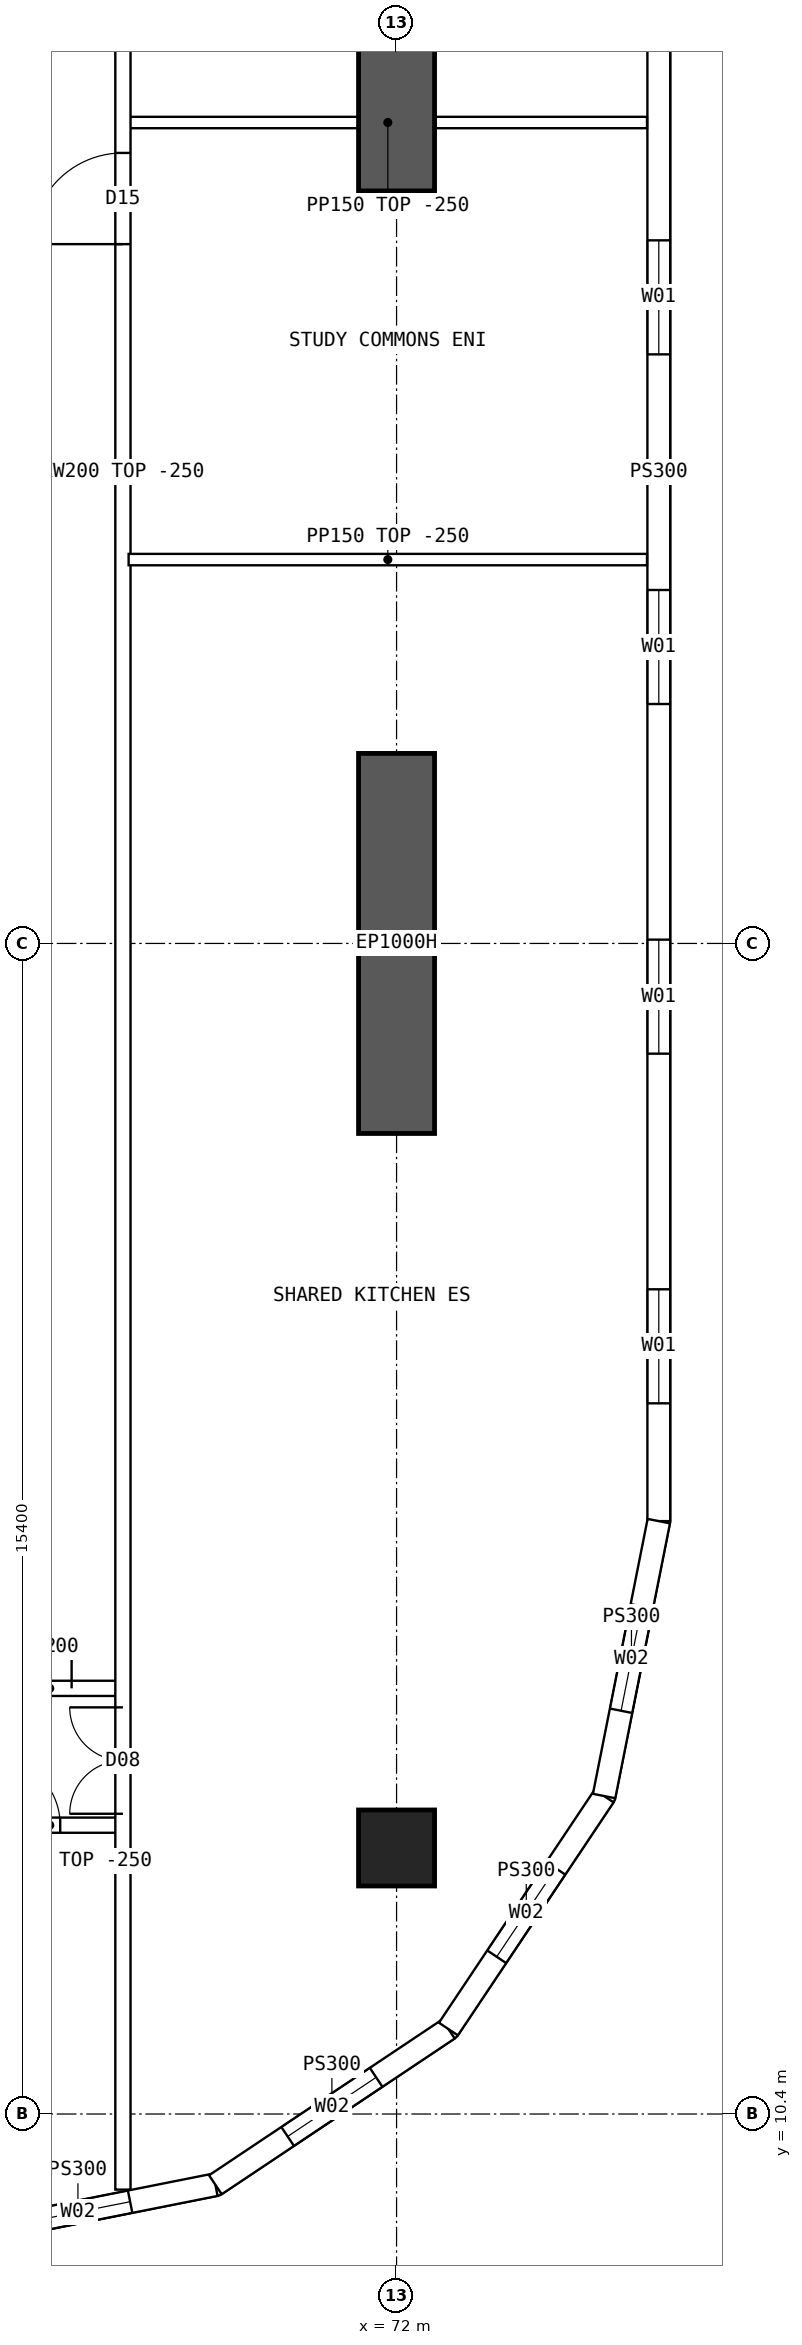
"""IFC4 building model, lengths in metres.
Left out: names, types, materials, properties, quantities, classifications, styles, units other than length and angle.
Written with IfcOpenShell. Run it as: python <this file> out.ifc"""

import sys

from ifc_helpers import new_model, si_unit, direction, frame, frame_2d, origin, origin_2d, place, context, subcontext, project, spatial, polyline, rectangle, hollow_rectangle, outline, extrude, element, fill, save


model = new_model("IFC4")
c1 = context("Model", 3, precision=1e-05, world=origin(), true_north=direction((0.0, 1.0)))
c2 = subcontext(c1, "Body", "Model", "MODEL_VIEW")
j1 = project(units=[si_unit("LENGTHUNIT", "METRE"), si_unit("PLANEANGLEUNIT", "RADIAN")], contexts=[c1])
p1 = place(None, origin())
s1 = spatial("IfcSite", under=j1, at=p1, CompositionType="ELEMENT")
p2 = place(p1, origin())
s2 = spatial("IfcBuilding", under=s1, at=p2, CompositionType="ELEMENT")
p3 = place(p2, frame((0.0, 0.0, 103.15)))
s3 = spatial("IfcBuildingStorey", under=s2, at=p3, CompositionType="ELEMENT", Elevation=103.15)
p4 = place(p3, frame((72.0, 13.9, 0.0), z_axis=(0.0, 0.0, 1.0), x_axis=(1.0, 0.0, 0.0)))
e1 = element("IfcColumn", 1, at=p4, inside=s3, PredefinedType="COLUMN", context=c2, shape_type="SweptSolid", body=[
    extrude(hollow_rectangle(XDim=1.0, YDim=1.0, WallThickness=0.1, at=origin_2d()), origin(), (0.0, 0.0, 1.0), 3.75),
])
for number, where, z_axis, x_axis in (
    (2, (72.0, 23.3, 0.0), (0.0, 0.0, 1.0), (0.0, 1.0, 0.0)),
    (3, (72.0, 35.7, 0.0), (0.0, 0.0, 1.0), (0.0, 1.0, 0.0)),
):
    element("IfcWall", number, at=place(p3, frame(where, z_axis=z_axis, x_axis=x_axis)), inside=s3, PredefinedType="SHEAR", context=c2, shape_type="SweptSolid", body=[
        extrude(rectangle(XDim=5.0, YDim=1.0, at=frame_2d((2.5, 0.0))), origin(), (0.0, 0.0, 1.0), 3.75),
    ])
p5 = place(p3, frame((75.45, 18.2, 0.0), z_axis=(0.0, 0.0, 1.0), x_axis=(0.0, 1.0, 0.0)))
e4 = element("IfcWall", 4, at=p5, inside=s3, PredefinedType="SOLIDWALL", context=c2, shape_type="SweptSolid", body=[
    extrude(outline(polyline([(-0.015, -0.15), (27.615, -0.15), (27.585, 0.15), (0.015, 0.15), (-0.015, -0.15)])), origin(), (0.0, 0.0, 1.0), 3.5),
])
p6 = place(p5, frame((1.55, 0.0, 0.9)))
e5 = element("IfcOpeningElement", 5, at=p6, cuts=e4, PredefinedType="OPENING", context=c2, shape_type="SweptSolid", body=[
    extrude(rectangle(XDim=1.5, YDim=2.0, at=frame_2d((0.75, 1.0))), frame((0.0, 0.16, 0.0), z_axis=(0.0, -1.0, 0.0), x_axis=(1.0, 0.0, 0.0)), (0.0, 0.0, 1.0), 0.32),
])
p7 = place(p5, frame((6.15, 0.0, 0.9)))
e6 = element("IfcOpeningElement", 6, at=p7, cuts=e4, PredefinedType="OPENING", context=c2, shape_type="SweptSolid", body=[
    extrude(rectangle(XDim=1.5, YDim=2.0, at=frame_2d((0.75, 1.0))), frame((0.0, 0.16, 0.0), z_axis=(0.0, -1.0, 0.0), x_axis=(1.0, 0.0, 0.0)), (0.0, 0.0, 1.0), 0.32),
])
p8 = place(p5, frame((10.75, 0.0, 0.9)))
e7 = element("IfcOpeningElement", 7, at=p8, cuts=e4, PredefinedType="OPENING", context=c2, shape_type="SweptSolid", body=[
    extrude(rectangle(XDim=1.5, YDim=2.0, at=frame_2d((0.75, 1.0))), frame((0.0, 0.16, 0.0), z_axis=(0.0, -1.0, 0.0), x_axis=(1.0, 0.0, 0.0)), (0.0, 0.0, 1.0), 0.32),
])
p9 = place(p5, frame((15.35, 0.0, 0.9)))
e8 = element("IfcOpeningElement", 8, at=p9, cuts=e4, PredefinedType="OPENING", context=c2, shape_type="SweptSolid", body=[
    extrude(rectangle(XDim=1.5, YDim=2.0, at=frame_2d((0.75, 1.0))), frame((0.0, 0.16, 0.0), z_axis=(0.0, -1.0, 0.0), x_axis=(1.0, 0.0, 0.0)), (0.0, 0.0, 1.0), 0.32),
])
p10 = place(p5, frame((19.95, 0.0, 0.9)))
e9 = element("IfcOpeningElement", 9, at=p10, cuts=e4, PredefinedType="OPENING", context=c2, shape_type="SweptSolid", body=[
    extrude(rectangle(XDim=1.5, YDim=2.0, at=frame_2d((0.75, 1.0))), frame((0.0, 0.16, 0.0), z_axis=(0.0, -1.0, 0.0), x_axis=(1.0, 0.0, 0.0)), (0.0, 0.0, 1.0), 0.32),
])
p11 = place(p5, frame((24.55, 0.0, 0.9)))
e10 = element("IfcOpeningElement", 10, at=p11, cuts=e4, PredefinedType="OPENING", context=c2, shape_type="SweptSolid", body=[
    extrude(rectangle(XDim=1.5, YDim=2.0, at=frame_2d((0.75, 1.0))), frame((0.0, 0.16, 0.0), z_axis=(0.0, -1.0, 0.0), x_axis=(1.0, 0.0, 0.0)), (0.0, 0.0, 1.0), 0.32),
])
p12 = place(p3, frame((66.0, 8.75, 0.0), z_axis=(0.0, 0.0, 1.0), x_axis=(0.980791473772, 0.195059183267, 0.0)))
e11 = element("IfcWall", 11, at=p12, inside=s3, PredefinedType="SOLIDWALL", context=c2, shape_type="SweptSolid", body=[
    extrude(outline(polyline([(-0.03, -0.15), (3.717, -0.15), (3.657, 0.15), (0.03, 0.15), (-0.03, -0.15)])), origin(), (0.0, 0.0, 1.0), 3.5),
])
p13 = place(p12, frame((1.144, 0.0, 0.9)))
e12 = element("IfcOpeningElement", 12, at=p13, cuts=e11, PredefinedType="OPENING", context=c2, shape_type="SweptSolid", body=[
    extrude(rectangle(XDim=1.4, YDim=1.8, at=frame_2d((0.7, 0.9))), frame((0.0, 0.16, 0.0), z_axis=(0.0, -1.0, 0.0), x_axis=(1.0, 0.0, 0.0)), (0.0, 0.0, 1.0), 0.32),
])
p14 = place(p3, frame((69.616, 9.469, 0.0), z_axis=(0.0, 0.0, 1.0), x_axis=(0.831448786846, 0.555601399253, 0.0)))
e13 = element("IfcWall", 13, at=p14, inside=s3, PredefinedType="SOLIDWALL", context=c2, shape_type="SweptSolid", body=[
    extrude(outline(polyline([(-0.03, -0.15), (3.717, -0.15), (3.657, 0.15), (0.03, 0.15), (-0.03, -0.15)])), origin(), (0.0, 0.0, 1.0), 3.5),
])
p15 = place(p14, frame((1.144, 0.0, 0.9)))
e14 = element("IfcOpeningElement", 14, at=p15, cuts=e13, PredefinedType="OPENING", context=c2, shape_type="SweptSolid", body=[
    extrude(rectangle(XDim=1.4, YDim=1.8, at=frame_2d((0.7, 0.9))), frame((0.0, 0.16, 0.0), z_axis=(0.0, -1.0, 0.0), x_axis=(1.0, 0.0, 0.0)), (0.0, 0.0, 1.0), 0.32),
])
p16 = place(p3, frame((72.682, 11.518, 0.0), z_axis=(0.0, 0.0, 1.0), x_axis=(0.555601399253, 0.831448786846, 0.0)))
e15 = element("IfcWall", 15, at=p16, inside=s3, PredefinedType="SOLIDWALL", context=c2, shape_type="SweptSolid", body=[
    extrude(outline(polyline([(-0.03, -0.15), (3.717, -0.15), (3.657, 0.15), (0.03, 0.15), (-0.03, -0.15)])), origin(), (0.0, 0.0, 1.0), 3.5),
])
p17 = place(p16, frame((1.144, 0.0, 0.9)))
e16 = element("IfcOpeningElement", 16, at=p17, cuts=e15, PredefinedType="OPENING", context=c2, shape_type="SweptSolid", body=[
    extrude(rectangle(XDim=1.4, YDim=1.8, at=frame_2d((0.7, 0.9))), frame((0.0, 0.16, 0.0), z_axis=(0.0, -1.0, 0.0), x_axis=(1.0, 0.0, 0.0)), (0.0, 0.0, 1.0), 0.32),
])
p18 = place(p3, frame((74.731, 14.583, 0.0), z_axis=(0.0, 0.0, 1.0), x_axis=(0.195059183267, 0.980791473772, 0.0)))
e17 = element("IfcWall", 17, at=p18, inside=s3, PredefinedType="SOLIDWALL", context=c2, shape_type="SweptSolid", body=[
    extrude(outline(polyline([(-0.03, -0.15), (3.702, -0.15), (3.672, 0.15), (0.03, 0.15), (-0.03, -0.15)])), origin(), (0.0, 0.0, 1.0), 3.5),
])
p19 = place(p18, frame((1.144, 0.0, 0.9)))
e18 = element("IfcOpeningElement", 18, at=p19, cuts=e17, PredefinedType="OPENING", context=c2, shape_type="SweptSolid", body=[
    extrude(rectangle(XDim=1.4, YDim=1.8, at=frame_2d((0.7, 0.9))), frame((0.0, 0.16, 0.0), z_axis=(0.0, -1.0, 0.0), x_axis=(1.0, 0.0, 0.0)), (0.0, 0.0, 1.0), 0.32),
])
p20 = place(p3, frame((66.475, 14.2, 0.0), z_axis=(0.0, 0.0, 1.0), x_axis=(1.0, 0.0, 0.0)))
e19 = element("IfcWall", 19, at=p20, inside=s3, PredefinedType="SOLIDWALL", context=c2, shape_type="SweptSolid", body=[
    extrude(rectangle(XDim=1.925, YDim=0.2, at=frame_2d((0.962, 0.0))), origin(), (0.0, 0.0, 1.0), 3.5),
])
p21 = place(p20, frame((0.2, 0.0, 0.0)))
e20 = element("IfcOpeningElement", 20, at=p21, cuts=e19, PredefinedType="OPENING", context=c2, shape_type="SweptSolid", body=[
    extrude(rectangle(XDim=0.9, YDim=2.1, at=frame_2d((0.45, 1.05))), frame((0.0, 0.11, 0.0), z_axis=(0.0, -1.0, 0.0), x_axis=(1.0, 0.0, 0.0)), (0.0, 0.0, 1.0), 0.22),
])
p22 = place(p3, frame((66.475, 16.0, 0.0), z_axis=(0.0, 0.0, 1.0), x_axis=(1.0, 0.0, 0.0)))
e21 = element("IfcWall", 21, at=p22, inside=s3, PredefinedType="SOLIDWALL", context=c2, shape_type="SweptSolid", body=[
    extrude(rectangle(XDim=1.925, YDim=0.2, at=frame_2d((0.962, 0.0))), origin(), (0.0, 0.0, 1.0), 3.5),
])
p23 = place(p22, frame((0.05, 0.0, 0.0)))
e22 = element("IfcOpeningElement", 22, at=p23, cuts=e21, PredefinedType="OPENING", context=c2, shape_type="SweptSolid", body=[
    extrude(rectangle(XDim=1.2, YDim=2.1, at=frame_2d((0.6, 1.05))), frame((0.0, 0.11, 0.0), z_axis=(0.0, -1.0, 0.0), x_axis=(1.0, 0.0, 0.0)), (0.0, 0.0, 1.0), 0.22),
])
p24 = place(p3, frame((68.475, 30.85, 0.0), z_axis=(0.0, 0.0, 1.0), x_axis=(1.0, 0.0, 0.0)))
e23 = element("IfcWall", 23, at=p24, inside=s3, PredefinedType="PARTITIONING", context=c2, shape_type="SweptSolid", body=[
    extrude(outline(polyline([(0.0, 0.0), (6.82, 0.0), (6.82, 3.5), (3.827, 3.5), (3.825, 3.05), (3.227, 3.05), (3.225, 3.5), (0.0, 3.5), (0.0, 0.0)])), frame((0.0, 0.075, 0.0), z_axis=(0.0, -1.0, 0.0), x_axis=(1.0, 0.0, 0.0)), (0.0, 0.0, 1.0), 0.15),
])
p25 = place(p3, frame((68.4, 9.405, 0.0), z_axis=(0.0, 0.0, 1.0), x_axis=(0.0, 1.0, 0.0)))
e24 = element("IfcWall", 24, at=p25, inside=s3, PredefinedType="SOLIDWALL", context=c2, shape_type="SweptSolid", body=[
    extrude(rectangle(XDim=45.189, YDim=0.2, at=frame_2d((22.595, 0.0))), origin(), (0.0, 0.0, 1.0), 3.5),
])
p26 = place(p25, frame((25.595, 0.0, 0.0)))
e25 = element("IfcOpeningElement", 25, at=p26, cuts=e24, PredefinedType="OPENING", context=c2, shape_type="SweptSolid", body=[
    extrude(rectangle(XDim=1.2, YDim=2.1, at=frame_2d((0.6, 1.05))), frame((0.0, 0.11, 0.0), z_axis=(0.0, -1.0, 0.0), x_axis=(1.0, 0.0, 0.0)), (0.0, 0.0, 1.0), 0.22),
])
p27 = place(p25, frame((4.945, 0.0, 0.0)))
e26 = element("IfcOpeningElement", 26, at=p27, cuts=e24, PredefinedType="OPENING", context=c2, shape_type="SweptSolid", body=[
    extrude(rectangle(XDim=1.4, YDim=2.1, at=frame_2d((0.7, 1.05))), frame((0.0, 0.11, 0.0), z_axis=(0.0, -1.0, 0.0), x_axis=(1.0, 0.0, 0.0)), (0.0, 0.0, 1.0), 0.22),
])
p28 = place(p25, frame((38.745, 0.0, 0.0)))
e27 = element("IfcOpeningElement", 27, at=p28, cuts=e24, PredefinedType="OPENING", context=c2, shape_type="SweptSolid", body=[
    extrude(rectangle(XDim=1.4, YDim=2.1, at=frame_2d((0.7, 1.05))), frame((0.0, 0.11, 0.0), z_axis=(0.0, -1.0, 0.0), x_axis=(1.0, 0.0, 0.0)), (0.0, 0.0, 1.0), 0.22),
])
p29 = place(p3, frame((68.475, 36.6, 0.0), z_axis=(0.0, 0.0, 1.0), x_axis=(1.0, 0.0, 0.0)))
e28 = element("IfcWall", 28, at=p29, inside=s3, PredefinedType="PARTITIONING", context=c2, shape_type="SweptSolid", body=[
    extrude(rectangle(XDim=6.82, YDim=0.15, at=frame_2d((3.41, 0.0))), origin(), (0.0, 0.0, 1.0), 3.5),
])
p30 = place(p6, origin())
e29 = element("IfcWindow", 29, at=p30, inside=s3, PartitioningType="SINGLE_PANEL", PredefinedType="WINDOW", context=c2, shape_type="SweptSolid", body=[
    extrude(rectangle(XDim=1.5, YDim=2.0, at=frame_2d((0.75, 1.0))), frame((0.0, 0.03, 0.0), z_axis=(0.0, -1.0, 0.0), x_axis=(1.0, 0.0, 0.0)), (0.0, 0.0, 1.0), 0.06),
])
fill(e5, e29)
p31 = place(p7, origin())
e30 = element("IfcWindow", 30, at=p31, inside=s3, PartitioningType="SINGLE_PANEL", PredefinedType="WINDOW", context=c2, shape_type="SweptSolid", body=[
    extrude(rectangle(XDim=1.5, YDim=2.0, at=frame_2d((0.75, 1.0))), frame((0.0, 0.03, 0.0), z_axis=(0.0, -1.0, 0.0), x_axis=(1.0, 0.0, 0.0)), (0.0, 0.0, 1.0), 0.06),
])
fill(e6, e30)
p32 = place(p8, origin())
e31 = element("IfcWindow", 31, at=p32, inside=s3, PartitioningType="SINGLE_PANEL", PredefinedType="WINDOW", context=c2, shape_type="SweptSolid", body=[
    extrude(rectangle(XDim=1.5, YDim=2.0, at=frame_2d((0.75, 1.0))), frame((0.0, 0.03, 0.0), z_axis=(0.0, -1.0, 0.0), x_axis=(1.0, 0.0, 0.0)), (0.0, 0.0, 1.0), 0.06),
])
fill(e7, e31)
p33 = place(p9, origin())
e32 = element("IfcWindow", 32, at=p33, inside=s3, PartitioningType="SINGLE_PANEL", PredefinedType="WINDOW", context=c2, shape_type="SweptSolid", body=[
    extrude(rectangle(XDim=1.5, YDim=2.0, at=frame_2d((0.75, 1.0))), frame((0.0, 0.03, 0.0), z_axis=(0.0, -1.0, 0.0), x_axis=(1.0, 0.0, 0.0)), (0.0, 0.0, 1.0), 0.06),
])
fill(e8, e32)
p34 = place(p13, origin())
e33 = element("IfcWindow", 33, at=p34, inside=s3, PartitioningType="SINGLE_PANEL", PredefinedType="WINDOW", context=c2, shape_type="SweptSolid", body=[
    extrude(rectangle(XDim=1.4, YDim=1.8, at=frame_2d((0.7, 0.9))), frame((0.0, 0.03, 0.0), z_axis=(0.0, -1.0, 0.0), x_axis=(1.0, 0.0, 0.0)), (0.0, 0.0, 1.0), 0.06),
])
fill(e12, e33)
p35 = place(p15, origin())
e34 = element("IfcWindow", 34, at=p35, inside=s3, PartitioningType="SINGLE_PANEL", PredefinedType="WINDOW", context=c2, shape_type="SweptSolid", body=[
    extrude(rectangle(XDim=1.4, YDim=1.8, at=frame_2d((0.7, 0.9))), frame((0.0, 0.03, 0.0), z_axis=(0.0, -1.0, 0.0), x_axis=(1.0, 0.0, 0.0)), (0.0, 0.0, 1.0), 0.06),
])
fill(e14, e34)
p36 = place(p17, origin())
e35 = element("IfcWindow", 35, at=p36, inside=s3, PartitioningType="SINGLE_PANEL", PredefinedType="WINDOW", context=c2, shape_type="SweptSolid", body=[
    extrude(rectangle(XDim=1.4, YDim=1.8, at=frame_2d((0.7, 0.9))), frame((0.0, 0.03, 0.0), z_axis=(0.0, -1.0, 0.0), x_axis=(1.0, 0.0, 0.0)), (0.0, 0.0, 1.0), 0.06),
])
fill(e16, e35)
p37 = place(p19, origin())
e36 = element("IfcWindow", 36, at=p37, inside=s3, PartitioningType="SINGLE_PANEL", PredefinedType="WINDOW", context=c2, shape_type="SweptSolid", body=[
    extrude(rectangle(XDim=1.4, YDim=1.8, at=frame_2d((0.7, 0.9))), frame((0.0, 0.03, 0.0), z_axis=(0.0, -1.0, 0.0), x_axis=(1.0, 0.0, 0.0)), (0.0, 0.0, 1.0), 0.06),
])
fill(e18, e36)
p38 = place(p23, origin())
e37 = element("IfcDoor", 37, at=p38, inside=s3, OperationType="DOUBLE_DOOR_SINGLE_SWING", PredefinedType="DOOR", context=c2, shape_type="SweptSolid", body=[
    extrude(rectangle(XDim=1.2, YDim=2.1, at=frame_2d((0.6, 1.05))), frame((0.0, 0.025, 0.0), z_axis=(0.0, -1.0, 0.0), x_axis=(1.0, 0.0, 0.0)), (0.0, 0.0, 1.0), 0.05),
])
fill(e22, e37)
p39 = place(p26, origin())
e38 = element("IfcDoor", 38, at=p39, inside=s3, OperationType="SINGLE_SWING_LEFT", PredefinedType="DOOR", context=c2, shape_type="SweptSolid", body=[
    extrude(rectangle(XDim=1.2, YDim=2.1, at=frame_2d((0.6, 1.05))), frame((0.0, 0.025, 0.0), z_axis=(0.0, -1.0, 0.0), x_axis=(1.0, 0.0, 0.0)), (0.0, 0.0, 1.0), 0.05),
])
fill(e25, e38)
p40 = place(p27, origin())
e39 = element("IfcDoor", 39, at=p40, inside=s3, OperationType="DOUBLE_DOOR_SINGLE_SWING", PredefinedType="DOOR", context=c2, shape_type="SweptSolid", body=[
    extrude(rectangle(XDim=1.4, YDim=2.1, at=frame_2d((0.7, 1.05))), frame((0.0, 0.025, 0.0), z_axis=(0.0, -1.0, 0.0), x_axis=(1.0, 0.0, 0.0)), (0.0, 0.0, 1.0), 0.05),
])
fill(e26, e39)
p41 = place(p21, origin())
e40 = element("IfcDoor", 40, at=p41, inside=s3, OperationType="SINGLE_SWING_LEFT", PredefinedType="DOOR", context=c2, shape_type="SweptSolid", body=[
    extrude(rectangle(XDim=0.9, YDim=2.1, at=frame_2d((0.45, 1.05))), frame((0.0, 0.025, 0.0), z_axis=(0.0, -1.0, 0.0), x_axis=(1.0, 0.0, 0.0)), (0.0, 0.0, 1.0), 0.05),
])
fill(e20, e40)
save(model, sys.argv[1])
